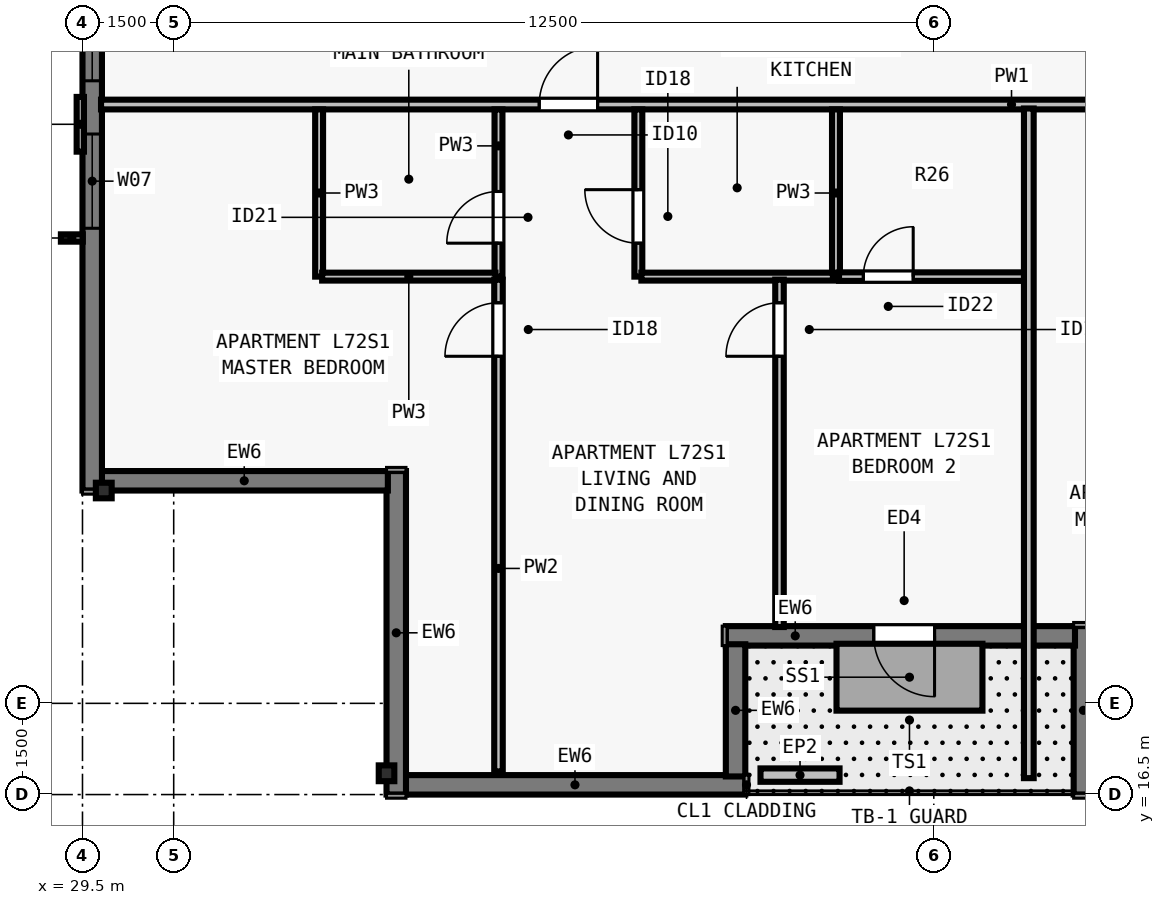
"""IFC4 building model, lengths in metres.
Left out: names, types, materials, properties, quantities, classifications, styles, units other than length and angle.
Written with IfcOpenShell. Run it as: python <this file> out.ifc"""

import sys

from ifc_helpers import new_model, si_unit, direction, frame, frame_2d, origin, origin_2d, place, context, subcontext, project, spatial, rectangle, i_section, extrude, element, fill, save


model = new_model("IFC4")
c1 = context("Model", 3, precision=1e-05, world=origin(), true_north=direction((0.0, 1.0)))
c2 = subcontext(c1, "Body", "Model", "MODEL_VIEW")
j1 = project(units=[si_unit("LENGTHUNIT", "METRE"), si_unit("PLANEANGLEUNIT", "RADIAN")], contexts=[c1])
p1 = place(None, origin())
s1 = spatial("IfcSite", under=j1, at=p1, CompositionType="ELEMENT")
p2 = place(p1, origin())
s2 = spatial("IfcBuilding", under=s1, at=p2, CompositionType="ELEMENT")
p3 = place(p2, frame((0.0, 0.0, 262.0)))
s3 = spatial("IfcBuildingStorey", under=s2, at=p3, CompositionType="ELEMENT", Elevation=262.0)
for number, where, z_axis, x_axis in (
    (1, (34.5, 16.85, 0.0), (0.0, 0.0, 1.0), (1.0, 0.0, 0.0)),
    (2, (29.85, 21.5, 0.0), (0.0, 0.0, 1.0), (0.0, 1.0, 0.0)),
):
    element("IfcColumn", number, at=place(p3, frame(where, z_axis=z_axis, x_axis=x_axis)), inside=s3, PredefinedType="COLUMN", context=c2, shape_type="SweptSolid", body=[
        extrude(i_section(OverallWidth=0.256, OverallDepth=0.26, WebThickness=0.01, FlangeThickness=0.017, FilletRadius=0.013, at=origin_2d()), origin(), (0.0, 0.0, 1.0), 3.5),
    ])
p4 = place(p3, frame((40.4, 16.66, 0.0), z_axis=(0.0, 0.0, 1.0), x_axis=(-1.0, 0.0, 0.0)))
e3 = element("IfcWall", 3, at=p4, inside=s3, PredefinedType="SOLIDWALL", context=c2, shape_type="SweptSolid", body=[
    extrude(rectangle(XDim=5.602, YDim=0.32, at=frame_2d((2.801, 0.0))), origin(), (0.0, 0.0, 1.0), 3.29),
])
p5 = place(p3, frame((34.66, 16.5, 0.0), z_axis=(0.0, 0.0, 1.0), x_axis=(0.0, 1.0, 0.0)))
e4 = element("IfcWall", 4, at=p5, inside=s3, PredefinedType="SOLIDWALL", context=c2, shape_type="SweptSolid", body=[
    extrude(rectangle(XDim=5.32, YDim=0.32, at=frame_2d((2.66, 0.0))), origin(), (0.0, 0.0, 1.0), 3.29),
])
p6 = place(p3, frame((34.522, 21.66, 0.0), z_axis=(0.0, 0.0, 1.0), x_axis=(-1.0, 0.0, 0.0)))
e5 = element("IfcWall", 5, at=p6, inside=s3, PredefinedType="SOLIDWALL", context=c2, shape_type="SweptSolid", body=[
    extrude(rectangle(XDim=4.724, YDim=0.32, at=frame_2d((2.362, 0.0))), origin(), (0.0, 0.0, 1.0), 3.29),
])
p7 = place(p3, frame((29.66, 21.5, 0.0), z_axis=(0.0, 0.0, 1.0), x_axis=(0.0, 1.0, 0.0)))
e6 = element("IfcWall", 6, at=p7, inside=s3, PredefinedType="SOLIDWALL", context=c2, shape_type="SweptSolid", body=[
    extrude(rectangle(XDim=34.702, YDim=0.32, at=frame_2d((17.351, 0.0))), origin(), (0.0, 0.0, 1.0), 3.29),
])
p8 = place(p7, frame((4.312, 0.0, 0.8)))
e7 = element("IfcOpeningElement", 7, at=p8, cuts=e6, PredefinedType="OPENING", context=c2, shape_type="SweptSolid", body=[
    extrude(rectangle(XDim=1.55, YDim=1.678, at=frame_2d((0.775, 0.839))), frame((0.0, 0.17, 0.0), z_axis=(0.0, -1.0, 0.0), x_axis=(1.0, 0.0, 0.0)), (0.0, 0.0, 1.0), 0.34),
])
p9 = place(p7, frame((6.738, 0.0, 0.8)))
e8 = element("IfcOpeningElement", 8, at=p9, cuts=e6, PredefinedType="OPENING", context=c2, shape_type="SweptSolid", body=[
    extrude(rectangle(XDim=1.85, YDim=1.678, at=frame_2d((0.925, 0.839))), frame((0.0, 0.17, 0.0), z_axis=(0.0, -1.0, 0.0), x_axis=(1.0, 0.0, 0.0)), (0.0, 0.0, 1.0), 0.34),
])
p10 = place(p7, frame((10.263, 0.0, 0.8)))
e9 = element("IfcOpeningElement", 9, at=p10, cuts=e6, PredefinedType="OPENING", context=c2, shape_type="SweptSolid", body=[
    extrude(rectangle(XDim=1.55, YDim=1.678, at=frame_2d((0.775, 0.839))), frame((0.0, 0.17, 0.0), z_axis=(0.0, -1.0, 0.0), x_axis=(1.0, 0.0, 0.0)), (0.0, 0.0, 1.0), 0.34),
])
p11 = place(p7, frame((14.738, 0.0, 0.8)))
e10 = element("IfcOpeningElement", 10, at=p11, cuts=e6, PredefinedType="OPENING", context=c2, shape_type="SweptSolid", body=[
    extrude(rectangle(XDim=1.85, YDim=1.678, at=frame_2d((0.925, 0.839))), frame((0.0, 0.17, 0.0), z_axis=(0.0, -1.0, 0.0), x_axis=(1.0, 0.0, 0.0)), (0.0, 0.0, 1.0), 0.34),
])
p12 = place(p7, frame((17.014, 0.0, 0.8)))
e11 = element("IfcOpeningElement", 11, at=p12, cuts=e6, PredefinedType="OPENING", context=c2, shape_type="SweptSolid", body=[
    extrude(rectangle(XDim=1.55, YDim=1.678, at=frame_2d((0.775, 0.839))), frame((0.0, 0.17, 0.0), z_axis=(0.0, -1.0, 0.0), x_axis=(1.0, 0.0, 0.0)), (0.0, 0.0, 1.0), 0.34),
])
p13 = place(p7, frame((24.164, 0.0, 0.8)))
e12 = element("IfcOpeningElement", 12, at=p13, cuts=e6, PredefinedType="OPENING", context=c2, shape_type="SweptSolid", body=[
    extrude(rectangle(XDim=1.55, YDim=1.678, at=frame_2d((0.775, 0.839))), frame((0.0, 0.17, 0.0), z_axis=(0.0, -1.0, 0.0), x_axis=(1.0, 0.0, 0.0)), (0.0, 0.0, 1.0), 0.34),
])
p14 = place(p3, frame((45.96, 16.5, 0.0), z_axis=(0.0, 0.0, 1.0), x_axis=(0.0, 1.0, 0.0)))
e13 = element("IfcWall", 13, at=p14, inside=s3, PredefinedType="SOLIDWALL", context=c2, shape_type="SweptSolid", body=[
    extrude(rectangle(XDim=2.77, YDim=0.32, at=frame_2d((1.385, 0.0))), origin(), (0.0, 0.0, 1.0), 3.29),
])
p15 = place(p3, frame((45.822, 19.11, 0.0), z_axis=(0.0, 0.0, 1.0), x_axis=(-1.0, 0.0, 0.0)))
e14 = element("IfcWall", 14, at=p15, inside=s3, PredefinedType="SOLIDWALL", context=c2, shape_type="SweptSolid", body=[
    extrude(rectangle(XDim=5.742, YDim=0.32, at=frame_2d((2.871, 0.0))), origin(), (0.0, 0.0, 1.0), 3.29),
])
p16 = place(p15, frame((2.31, 0.0, 0.0)))
e15 = element("IfcOpeningElement", 15, at=p16, cuts=e14, PredefinedType="OPENING", context=c2, shape_type="SweptSolid", body=[
    extrude(rectangle(XDim=1.0, YDim=2.15, at=frame_2d((0.5, 1.075))), frame((0.0, 0.17, 0.0), z_axis=(0.0, -1.0, 0.0), x_axis=(1.0, 0.0, 0.0)), (0.0, 0.0, 1.0), 0.34),
])
p17 = place(p3, frame((40.24, 18.972, 0.0), z_axis=(0.0, 0.0, 1.0), x_axis=(0.0, -1.0, 0.0)))
e16 = element("IfcWall", 16, at=p17, inside=s3, PredefinedType="SOLIDWALL", context=c2, shape_type="SweptSolid", body=[
    extrude(rectangle(XDim=2.174, YDim=0.32, at=frame_2d((1.087, 0.0))), origin(), (0.0, 0.0, 1.0), 3.29),
])
p18 = place(p3, frame((40.65, 16.82, 0.0), z_axis=(0.0, 0.0, 1.0), x_axis=(1.0, 0.0, 0.0)))
e17 = element("IfcWall", 17, at=p18, inside=s3, PredefinedType="PARAPET", context=c2, shape_type="SweptSolid", body=[
    extrude(rectangle(XDim=1.3, YDim=0.22, at=frame_2d((0.65, 0.0))), origin(), (0.0, 0.0, 1.0), 0.55),
])
p19 = place(p3, frame((29.805, 27.847, 0.0), z_axis=(0.0, 0.0, 1.0), x_axis=(1.0, 0.0, 0.0)))
e18 = element("IfcWall", 18, at=p19, inside=s3, PredefinedType="PARTITIONING", context=c2, shape_type="SweptSolid", body=[
    extrude(rectangle(XDim=44.39, YDim=0.16, at=frame_2d((22.195, 0.0))), origin(), (0.0, 0.0, 1.0), 2.958),
])
p20 = place(p19, frame((7.206, 0.0, 0.0)))
e19 = element("IfcOpeningElement", 19, at=p20, cuts=e18, PredefinedType="OPENING", context=c2, shape_type="SweptSolid", body=[
    extrude(rectangle(XDim=0.96, YDim=2.18, at=frame_2d((0.48, 1.09))), frame((0.0, 0.09, 0.0), z_axis=(0.0, -1.0, 0.0), x_axis=(1.0, 0.0, 0.0)), (0.0, 0.0, 1.0), 0.18),
])
p21 = place(p19, frame((21.78, 0.0, 0.0)))
e20 = element("IfcOpeningElement", 20, at=p21, cuts=e18, PredefinedType="OPENING", context=c2, shape_type="SweptSolid", body=[
    extrude(rectangle(XDim=0.96, YDim=2.18, at=frame_2d((0.48, 1.09))), frame((0.0, 0.09, 0.0), z_axis=(0.0, -1.0, 0.0), x_axis=(1.0, 0.0, 0.0)), (0.0, 0.0, 1.0), 0.18),
])
p22 = place(p19, frame((36.289, 0.0, 0.0)))
e21 = element("IfcOpeningElement", 21, at=p22, cuts=e18, PredefinedType="OPENING", context=c2, shape_type="SweptSolid", body=[
    extrude(rectangle(XDim=0.96, YDim=2.18, at=frame_2d((0.48, 1.09))), frame((0.0, 0.09, 0.0), z_axis=(0.0, -1.0, 0.0), x_axis=(1.0, 0.0, 0.0)), (0.0, 0.0, 1.0), 0.18),
])
p23 = place(p3, frame((33.391, 25.018, 0.0), z_axis=(0.0, 0.0, 1.0), x_axis=(0.0, 1.0, 0.0)))
e22 = element("IfcWall", 22, at=p23, inside=s3, PredefinedType="PLUMBINGWALL", context=c2, shape_type="SweptSolid", body=[
    extrude(rectangle(XDim=2.75, YDim=0.13, at=frame_2d((1.375, 0.0))), origin(), (0.0, 0.0, 1.0), 3.29),
])
p24 = place(p3, frame((36.341, 25.018, 0.0), z_axis=(0.0, 0.0, 1.0), x_axis=(0.0, 1.0, 0.0)))
e23 = element("IfcWall", 23, at=p24, inside=s3, PredefinedType="PLUMBINGWALL", context=c2, shape_type="SweptSolid", body=[
    extrude(rectangle(XDim=2.75, YDim=0.13, at=frame_2d((1.375, 0.0))), origin(), (0.0, 0.0, 1.0), 3.29),
])
p25 = place(p24, frame((0.55, 0.0, 0.0)))
e24 = element("IfcOpeningElement", 24, at=p25, cuts=e23, PredefinedType="OPENING", context=c2, shape_type="SweptSolid", body=[
    extrude(rectangle(XDim=0.85, YDim=2.08, at=frame_2d((0.425, 1.04))), frame((0.0, 0.075, 0.0), z_axis=(0.0, -1.0, 0.0), x_axis=(1.0, 0.0, 0.0)), (0.0, 0.0, 1.0), 0.15),
])
p26 = place(p3, frame((33.441, 25.018, 0.0), z_axis=(0.0, 0.0, 1.0), x_axis=(1.0, 0.0, 0.0)))
e25 = element("IfcWall", 25, at=p26, inside=s3, PredefinedType="PLUMBINGWALL", context=c2, shape_type="SweptSolid", body=[
    extrude(rectangle(XDim=2.85, YDim=0.13, at=frame_2d((1.425, 0.0))), origin(), (0.0, 0.0, 1.0), 2.958),
])
p27 = place(p3, frame((41.891, 25.018, 0.0), z_axis=(0.0, 0.0, 1.0), x_axis=(0.0, 1.0, 0.0)))
e26 = element("IfcWall", 26, at=p27, inside=s3, PredefinedType="PLUMBINGWALL", context=c2, shape_type="SweptSolid", body=[
    extrude(rectangle(XDim=2.75, YDim=0.13, at=frame_2d((1.375, 0.0))), origin(), (0.0, 0.0, 1.0), 3.29),
])
p28 = place(p3, frame((38.641, 25.018, 0.0), z_axis=(0.0, 0.0, 1.0), x_axis=(0.0, 1.0, 0.0)))
e27 = element("IfcWall", 27, at=p28, inside=s3, PredefinedType="PLUMBINGWALL", context=c2, shape_type="SweptSolid", body=[
    extrude(rectangle(XDim=2.75, YDim=0.13, at=frame_2d((1.375, 0.0))), origin(), (0.0, 0.0, 1.0), 3.29),
])
p29 = place(p28, frame((0.55, 0.0, 0.0)))
e28 = element("IfcOpeningElement", 28, at=p29, cuts=e27, PredefinedType="OPENING", context=c2, shape_type="SweptSolid", body=[
    extrude(rectangle(XDim=0.88, YDim=2.1, at=frame_2d((0.44, 1.05))), frame((0.0, 0.075, 0.0), z_axis=(0.0, -1.0, 0.0), x_axis=(1.0, 0.0, 0.0)), (0.0, 0.0, 1.0), 0.15),
])
p30 = place(p3, frame((38.691, 25.018, 0.0), z_axis=(0.0, 0.0, 1.0), x_axis=(1.0, 0.0, 0.0)))
e29 = element("IfcWall", 29, at=p30, inside=s3, PredefinedType="PLUMBINGWALL", context=c2, shape_type="SweptSolid", body=[
    extrude(rectangle(XDim=3.15, YDim=0.13, at=frame_2d((1.575, 0.0))), origin(), (0.0, 0.0, 1.0), 3.29),
])
p31 = place(p3, frame((36.341, 16.88, 0.0), z_axis=(0.0, 0.0, 1.0), x_axis=(0.0, 1.0, 0.0)))
e30 = element("IfcWall", 30, at=p31, inside=s3, PredefinedType="PARTITIONING", context=c2, shape_type="SweptSolid", body=[
    extrude(rectangle(XDim=8.088, YDim=0.14, at=frame_2d((4.044, 0.0))), origin(), (0.0, 0.0, 1.0), 2.573),
])
p32 = place(p31, frame((6.827, 0.0, 0.0)))
e31 = element("IfcOpeningElement", 31, at=p32, cuts=e30, PredefinedType="OPENING", context=c2, shape_type="SweptSolid", body=[
    extrude(rectangle(XDim=0.88, YDim=2.1, at=frame_2d((0.44, 1.05))), frame((0.0, 0.08, 0.0), z_axis=(0.0, -1.0, 0.0), x_axis=(1.0, 0.0, 0.0)), (0.0, 0.0, 1.0), 0.16),
])
p33 = place(p3, frame((40.962, 19.255, 0.0), z_axis=(0.0, 0.0, 1.0), x_axis=(0.0, 1.0, 0.0)))
e32 = element("IfcWall", 32, at=p33, inside=s3, PredefinedType="PARTITIONING", context=c2, shape_type="SweptSolid", body=[
    extrude(rectangle(XDim=5.713, YDim=0.14, at=frame_2d((2.856, 0.0))), origin(), (0.0, 0.0, 1.0), 3.29),
])
p34 = place(p33, frame((4.452, 0.0, 0.0)))
e33 = element("IfcOpeningElement", 33, at=p34, cuts=e32, PredefinedType="OPENING", context=c2, shape_type="SweptSolid", body=[
    extrude(rectangle(XDim=0.88, YDim=2.1, at=frame_2d((0.44, 1.05))), frame((0.0, 0.08, 0.0), z_axis=(0.0, -1.0, 0.0), x_axis=(1.0, 0.0, 0.0)), (0.0, 0.0, 1.0), 0.16),
])
p35 = place(p3, frame((41.941, 25.018, 0.0), z_axis=(0.0, 0.0, 1.0), x_axis=(1.0, 0.0, 0.0)))
e34 = element("IfcWall", 34, at=p35, inside=s3, PredefinedType="PARTITIONING", context=c2, shape_type="SweptSolid", body=[
    extrude(rectangle(XDim=3.171, YDim=0.14, at=frame_2d((1.586, 0.0))), origin(), (0.0, 0.0, 1.0), 3.29),
])
p36 = place(p35, frame((0.4, 0.0, 0.0)))
e35 = element("IfcOpeningElement", 35, at=p36, cuts=e34, PredefinedType="OPENING", context=c2, shape_type="SweptSolid", body=[
    extrude(rectangle(XDim=0.82, YDim=2.1, at=frame_2d((0.41, 1.05))), frame((0.0, 0.08, 0.0), z_axis=(0.0, -1.0, 0.0), x_axis=(1.0, 0.0, 0.0)), (0.0, 0.0, 1.0), 0.16),
])
p37 = place(p3, frame((45.062, 16.77, 0.0), z_axis=(0.0, 0.0, 1.0), x_axis=(0.0, 1.0, 0.0)))
e36 = element("IfcWall", 36, at=p37, inside=s3, PredefinedType="PARTITIONING", context=c2, shape_type="SweptSolid", body=[
    extrude(rectangle(XDim=11.012, YDim=0.16, at=frame_2d((5.506, 0.0))), origin(), (0.0, 0.0, 1.0), 3.29),
])
p38 = place(p8, origin())
e37 = element("IfcWindow", 37, at=p38, inside=s3, PartitioningType="SINGLE_PANEL", PredefinedType="WINDOW", context=c2, shape_type="SweptSolid", body=[
    extrude(rectangle(XDim=1.55, YDim=1.678, at=frame_2d((0.775, 0.839))), frame((0.0, -0.05, 0.0), z_axis=(0.0, -1.0, 0.0), x_axis=(1.0, 0.0, 0.0)), (0.0, 0.0, 1.0), 0.06),
])
fill(e7, e37)
p39 = place(p9, origin())
e38 = element("IfcWindow", 38, at=p39, inside=s3, PartitioningType="SINGLE_PANEL", PredefinedType="WINDOW", context=c2, shape_type="SweptSolid", body=[
    extrude(rectangle(XDim=1.85, YDim=1.678, at=frame_2d((0.925, 0.839))), frame((0.0, -0.05, 0.0), z_axis=(0.0, -1.0, 0.0), x_axis=(1.0, 0.0, 0.0)), (0.0, 0.0, 1.0), 0.06),
])
fill(e8, e38)
p40 = place(p16, origin())
e39 = element("IfcDoor", 39, at=p40, inside=s3, OperationType="SINGLE_SWING_LEFT", PredefinedType="DOOR", context=c2, shape_type="SweptSolid", body=[
    extrude(rectangle(XDim=1.0, YDim=2.15, at=frame_2d((0.5, 1.075))), frame((0.0, 0.025, 0.0), z_axis=(0.0, -1.0, 0.0), x_axis=(1.0, 0.0, 0.0)), (0.0, 0.0, 1.0), 0.05),
])
fill(e15, e39)
p41 = place(p25, origin())
e40 = element("IfcDoor", 40, at=p41, inside=s3, OperationType="SINGLE_SWING_LEFT", PredefinedType="DOOR", context=c2, shape_type="SweptSolid", body=[
    extrude(rectangle(XDim=0.85, YDim=2.08, at=frame_2d((0.425, 1.04))), frame((0.0, 0.025, 0.0), z_axis=(0.0, -1.0, 0.0), x_axis=(1.0, 0.0, 0.0)), (0.0, 0.0, 1.0), 0.05),
])
fill(e24, e40)
p42 = place(p29, origin())
e41 = element("IfcDoor", 41, at=p42, inside=s3, OperationType="SINGLE_SWING_RIGHT", PredefinedType="DOOR", context=c2, shape_type="SweptSolid", body=[
    extrude(rectangle(XDim=0.88, YDim=2.1, at=frame_2d((0.44, 1.05))), frame((0.0, 0.025, 0.0), z_axis=(0.0, -1.0, 0.0), x_axis=(1.0, 0.0, 0.0)), (0.0, 0.0, 1.0), 0.05),
])
fill(e28, e41)
p43 = place(p32, origin())
e42 = element("IfcDoor", 42, at=p43, inside=s3, OperationType="SINGLE_SWING_LEFT", PredefinedType="DOOR", context=c2, shape_type="SweptSolid", body=[
    extrude(rectangle(XDim=0.88, YDim=2.1, at=frame_2d((0.44, 1.05))), frame((0.0, 0.025, 0.0), z_axis=(0.0, -1.0, 0.0), x_axis=(1.0, 0.0, 0.0)), (0.0, 0.0, 1.0), 0.05),
])
fill(e31, e42)
p44 = place(p36, origin())
e43 = element("IfcDoor", 43, at=p44, inside=s3, OperationType="SINGLE_SWING_RIGHT", PredefinedType="DOOR", context=c2, shape_type="SweptSolid", body=[
    extrude(rectangle(XDim=0.82, YDim=2.1, at=frame_2d((0.41, 1.05))), frame((0.0, 0.025, 0.0), z_axis=(0.0, -1.0, 0.0), x_axis=(1.0, 0.0, 0.0)), (0.0, 0.0, 1.0), 0.05),
])
fill(e35, e43)
p45 = place(p34, origin())
e44 = element("IfcDoor", 44, at=p45, inside=s3, OperationType="SINGLE_SWING_LEFT", PredefinedType="DOOR", context=c2, shape_type="SweptSolid", body=[
    extrude(rectangle(XDim=0.88, YDim=2.1, at=frame_2d((0.44, 1.05))), frame((0.0, 0.025, 0.0), z_axis=(0.0, -1.0, 0.0), x_axis=(1.0, 0.0, 0.0)), (0.0, 0.0, 1.0), 0.05),
])
fill(e33, e44)
p46 = place(p20, origin())
e45 = element("IfcDoor", 45, at=p46, inside=s3, OperationType="SINGLE_SWING_RIGHT", PredefinedType="DOOR", context=c2, shape_type="SweptSolid", body=[
    extrude(rectangle(XDim=0.96, YDim=2.18, at=frame_2d((0.48, 1.09))), frame((0.0, 0.025, 0.0), z_axis=(0.0, -1.0, 0.0), x_axis=(1.0, 0.0, 0.0)), (0.0, 0.0, 1.0), 0.05),
])
fill(e19, e45)
save(model, sys.argv[1])
